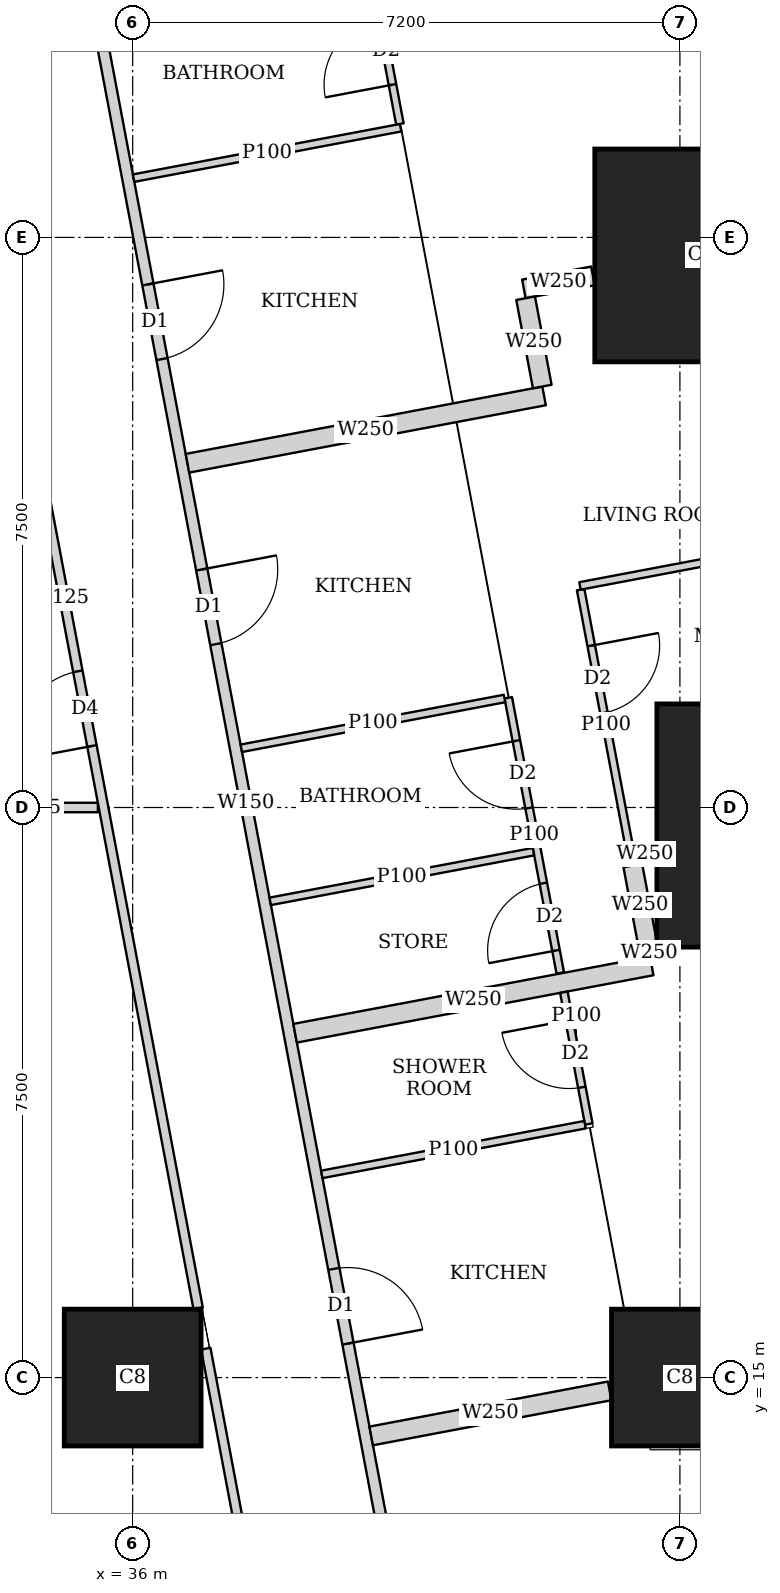
"""IFC4 building model, lengths in metres.
Left out: names, types, materials, properties, quantities, classifications, styles, units other than length and angle.
Written with IfcOpenShell. Run it as: python <this file> out.ifc"""

import sys

from ifc_helpers import new_model, si_unit, direction, frame, frame_2d, origin, origin_2d, place, context, subcontext, project, spatial, rectangle, extrude, element, fill, save


model = new_model("IFC4")
c1 = context("Model", 3, precision=1e-05, world=origin(), true_north=direction((0.0, 1.0)))
c2 = subcontext(c1, "Body", "Model", "MODEL_VIEW")
j1 = project(units=[si_unit("LENGTHUNIT", "METRE"), si_unit("PLANEANGLEUNIT", "RADIAN")], contexts=[c1])
p1 = place(None, origin())
s1 = spatial("IfcSite", under=j1, at=p1, CompositionType="ELEMENT")
p2 = place(p1, origin())
s2 = spatial("IfcBuilding", under=s1, at=p2, CompositionType="ELEMENT")
p3 = place(p2, frame((0.0, 0.0, 68.75)))
s3 = spatial("IfcBuildingStorey", under=s2, at=p3, CompositionType="ELEMENT", Elevation=68.75)
for number, where, z_axis, x_axis in (
    (1, (36.0, 15.0, 0.0), (0.0, 0.0, 1.0), (1.0, 0.0, 0.0)),
    (2, (43.2, 15.0, 0.0), (0.0, 0.0, 1.0), (1.0, 0.0, 0.0)),
):
    element("IfcColumn", number, at=place(p3, frame(where, z_axis=z_axis, x_axis=x_axis)), inside=s3, PredefinedType="COLUMN", context=c2, shape_type="SweptSolid", body=[
        extrude(rectangle(XDim=1.8, YDim=1.8, at=origin_2d()), origin(), (0.0, 0.0, 1.0), 3.75),
    ])
p4 = place(p3, frame((44.697, 22.263, 0.0), z_axis=(0.0, 0.0, 1.0), x_axis=(1.0, 0.0, 0.0)))
e3 = element("IfcColumn", 3, at=p4, inside=s3, PredefinedType="COLUMN", context=c2, shape_type="SweptSolid", body=[
    extrude(rectangle(XDim=3.6, YDim=3.2, at=origin_2d()), origin(), (0.0, 0.0, 1.0), 3.75),
])
p5 = place(p3, frame((43.48, 29.763, 0.0), z_axis=(0.0, 0.0, 1.0), x_axis=(1.0, 0.0, 0.0)))
e4 = element("IfcColumn", 4, at=p5, inside=s3, PredefinedType="COLUMN", context=c2, shape_type="SweptSolid", body=[
    extrude(rectangle(XDim=2.8, YDim=2.8, at=origin_2d()), origin(), (0.0, 0.0, 1.0), 3.75),
])
p6 = place(p3, frame((50.653, 2.703, 0.0), z_axis=(0.0, 0.0, 1.0), x_axis=(-0.185612026696, 0.982623109613, 0.0)))
e5 = element("IfcWall", 5, at=p6, inside=s3, PredefinedType="SOLIDWALL", context=c2, shape_type="SweptSolid", body=[
    extrude(rectangle(XDim=41.393, YDim=0.2, at=frame_2d((20.697, 0.0))), origin(), (0.0, 0.0, 1.0), 3.45),
])
p7 = place(p6, frame((1.633, 0.0, 0.9)))
e6 = element("IfcOpeningElement", 6, at=p7, cuts=e5, PredefinedType="OPENING", context=c2, shape_type="SweptSolid", body=[
    extrude(rectangle(XDim=1.8, YDim=1.5, at=frame_2d((0.9, 0.75))), frame((0.0, 0.11, 0.0), z_axis=(0.0, -1.0, 0.0), x_axis=(1.0, 0.0, 0.0)), (0.0, 0.0, 1.0), 0.22),
])
p8 = place(p6, frame((6.032, 0.0, 0.9)))
e7 = element("IfcOpeningElement", 7, at=p8, cuts=e5, PredefinedType="OPENING", context=c2, shape_type="SweptSolid", body=[
    extrude(rectangle(XDim=1.8, YDim=1.5, at=frame_2d((0.9, 0.75))), frame((0.0, 0.11, 0.0), z_axis=(0.0, -1.0, 0.0), x_axis=(1.0, 0.0, 0.0)), (0.0, 0.0, 1.0), 0.22),
])
p9 = place(p6, frame((9.848, 0.0, 0.9)))
e8 = element("IfcOpeningElement", 8, at=p9, cuts=e5, PredefinedType="OPENING", context=c2, shape_type="SweptSolid", body=[
    extrude(rectangle(XDim=1.8, YDim=1.5, at=frame_2d((0.9, 0.75))), frame((0.0, 0.11, 0.0), z_axis=(0.0, -1.0, 0.0), x_axis=(1.0, 0.0, 0.0)), (0.0, 0.0, 1.0), 0.22),
])
p10 = place(p6, frame((17.481, 0.0, 0.9)))
e9 = element("IfcOpeningElement", 9, at=p10, cuts=e5, PredefinedType="OPENING", context=c2, shape_type="SweptSolid", body=[
    extrude(rectangle(XDim=1.8, YDim=1.5, at=frame_2d((0.9, 0.75))), frame((0.0, 0.11, 0.0), z_axis=(0.0, -1.0, 0.0), x_axis=(1.0, 0.0, 0.0)), (0.0, 0.0, 1.0), 0.22),
])
p11 = place(p6, frame((21.297, 0.0, 0.9)))
e10 = element("IfcOpeningElement", 10, at=p11, cuts=e5, PredefinedType="OPENING", context=c2, shape_type="SweptSolid", body=[
    extrude(rectangle(XDim=1.8, YDim=1.5, at=frame_2d((0.9, 0.75))), frame((0.0, 0.11, 0.0), z_axis=(0.0, -1.0, 0.0), x_axis=(1.0, 0.0, 0.0)), (0.0, 0.0, 1.0), 0.22),
])
p12 = place(p6, frame((25.113, 0.0, 0.9)))
e11 = element("IfcOpeningElement", 11, at=p12, cuts=e5, PredefinedType="OPENING", context=c2, shape_type="SweptSolid", body=[
    extrude(rectangle(XDim=1.8, YDim=1.5, at=frame_2d((0.9, 0.75))), frame((0.0, 0.11, 0.0), z_axis=(0.0, -1.0, 0.0), x_axis=(1.0, 0.0, 0.0)), (0.0, 0.0, 1.0), 0.22),
])
p13 = place(p6, frame((28.93, 0.0, 0.9)))
e12 = element("IfcOpeningElement", 12, at=p13, cuts=e5, PredefinedType="OPENING", context=c2, shape_type="SweptSolid", body=[
    extrude(rectangle(XDim=1.8, YDim=1.5, at=frame_2d((0.9, 0.75))), frame((0.0, 0.11, 0.0), z_axis=(0.0, -1.0, 0.0), x_axis=(1.0, 0.0, 0.0)), (0.0, 0.0, 1.0), 0.22),
])
p14 = place(p6, frame((32.746, 0.0, 0.9)))
e13 = element("IfcOpeningElement", 13, at=p14, cuts=e5, PredefinedType="OPENING", context=c2, shape_type="SweptSolid", body=[
    extrude(rectangle(XDim=1.8, YDim=1.5, at=frame_2d((0.9, 0.75))), frame((0.0, 0.11, 0.0), z_axis=(0.0, -1.0, 0.0), x_axis=(1.0, 0.0, 0.0)), (0.0, 0.0, 1.0), 0.22),
])
p15 = place(p6, frame((36.481, 0.0, 0.9)))
e14 = element("IfcOpeningElement", 14, at=p15, cuts=e5, PredefinedType="OPENING", context=c2, shape_type="SweptSolid", body=[
    extrude(rectangle(XDim=1.8, YDim=1.5, at=frame_2d((0.9, 0.75))), frame((0.0, 0.11, 0.0), z_axis=(0.0, -1.0, 0.0), x_axis=(1.0, 0.0, 0.0)), (0.0, 0.0, 1.0), 0.22),
])
p16 = place(p3, frame((33.68, 42.723, 0.0), z_axis=(0.0, 0.0, 1.0), x_axis=(0.185624129307, -0.98262082342, 0.0)))
e15 = element("IfcWall", 15, at=p16, inside=s3, PredefinedType="SOLIDWALL", context=c2, shape_type="SweptSolid", body=[
    extrude(rectangle(XDim=41.051, YDim=0.15, at=frame_2d((20.526, 0.0))), origin(), (0.0, 0.0, 1.0), 2.45),
])
p17 = place(p16, frame((13.577, 0.0, 0.0)))
e16 = element("IfcOpeningElement", 16, at=p17, cuts=e15, PredefinedType="OPENING", context=c2, shape_type="SweptSolid", body=[
    extrude(rectangle(XDim=1.0, YDim=2.1, at=frame_2d((0.5, 1.05))), frame((0.0, 0.085, 0.0), z_axis=(0.0, -1.0, 0.0), x_axis=(1.0, 0.0, 0.0)), (0.0, 0.0, 1.0), 0.17),
])
p18 = place(p16, frame((17.394, 0.0, 0.0)))
e17 = element("IfcOpeningElement", 17, at=p18, cuts=e15, PredefinedType="OPENING", context=c2, shape_type="SweptSolid", body=[
    extrude(rectangle(XDim=1.0, YDim=2.1, at=frame_2d((0.5, 1.05))), frame((0.0, 0.085, 0.0), z_axis=(0.0, -1.0, 0.0), x_axis=(1.0, 0.0, 0.0)), (0.0, 0.0, 1.0), 0.17),
])
p19 = place(p16, frame((26.758, 0.0, 0.0)))
e18 = element("IfcOpeningElement", 18, at=p19, cuts=e15, PredefinedType="OPENING", context=c2, shape_type="SweptSolid", body=[
    extrude(rectangle(XDim=1.0, YDim=2.1, at=frame_2d((0.5, 1.05))), frame((0.0, 0.085, 0.0), z_axis=(0.0, -1.0, 0.0), x_axis=(1.0, 0.0, 0.0)), (0.0, 0.0, 1.0), 0.17),
])
p20 = place(p16, frame((32.193, 0.0, 0.0)))
e19 = element("IfcOpeningElement", 19, at=p20, cuts=e15, PredefinedType="OPENING", context=c2, shape_type="SweptSolid", body=[
    extrude(rectangle(XDim=1.0, YDim=2.1, at=frame_2d((0.5, 1.05))), frame((0.0, 0.085, 0.0), z_axis=(0.0, -1.0, 0.0), x_axis=(1.0, 0.0, 0.0)), (0.0, 0.0, 1.0), 0.17),
])
p21 = place(p3, frame((37.515, 42.089, 0.0), z_axis=(0.0, 0.0, 1.0), x_axis=(0.185565000991, -0.982631991341, 0.0)))
e20 = element("IfcWall", 20, at=p21, inside=s3, PredefinedType="PARTITIONING", context=c2, shape_type="SweptSolid", body=[
    extrude(rectangle(XDim=10.784, YDim=0.1, at=frame_2d((5.392, 0.0))), origin(), (0.0, 0.0, 1.0), 3.45),
])
p22 = place(p21, frame((9.358, 0.0, 0.0)))
e21 = element("IfcOpeningElement", 21, at=p22, cuts=e20, PredefinedType="OPENING", context=c2, shape_type="SweptSolid", body=[
    extrude(rectangle(XDim=0.9, YDim=2.1, at=frame_2d((0.45, 1.05))), frame((0.0, 0.06, 0.0), z_axis=(0.0, -1.0, 0.0), x_axis=(1.0, 0.0, 0.0)), (0.0, 0.0, 1.0), 0.12),
])
p23 = place(p21, frame((5.173, 0.0, 0.0)))
e22 = element("IfcOpeningElement", 22, at=p23, cuts=e20, PredefinedType="OPENING", context=c2, shape_type="SweptSolid", body=[
    extrude(rectangle(XDim=0.9, YDim=2.1, at=frame_2d((0.45, 1.05))), frame((0.0, 0.06, 0.0), z_axis=(0.0, -1.0, 0.0), x_axis=(1.0, 0.0, 0.0)), (0.0, 0.0, 1.0), 0.12),
])
p24 = place(p21, frame((2.629, 0.0, 0.0)))
e23 = element("IfcOpeningElement", 23, at=p24, cuts=e20, PredefinedType="OPENING", context=c2, shape_type="SweptSolid", body=[
    extrude(rectangle(XDim=0.9, YDim=2.1, at=frame_2d((0.45, 1.05))), frame((0.0, 0.06, 0.0), z_axis=(0.0, -1.0, 0.0), x_axis=(1.0, 0.0, 0.0)), (0.0, 0.0, 1.0), 0.12),
])
p25 = place(p21, frame((7.451, 0.0, 0.0)))
e24 = element("IfcOpeningElement", 24, at=p25, cuts=e20, PredefinedType="OPENING", context=c2, shape_type="SweptSolid", body=[
    extrude(rectangle(XDim=0.9, YDim=2.1, at=frame_2d((0.45, 1.05))), frame((0.0, 0.06, 0.0), z_axis=(0.0, -1.0, 0.0), x_axis=(1.0, 0.0, 0.0)), (0.0, 0.0, 1.0), 0.12),
])
p26 = place(p3, frame((39.525, 31.443, 0.0), z_axis=(0.0, 0.0, 1.0), x_axis=(-0.982648035033, -0.185480023848, 0.0)))
e25 = element("IfcWall", 25, at=p26, inside=s3, PredefinedType="PARTITIONING", context=c2, shape_type="SweptSolid", body=[
    extrude(rectangle(XDim=3.575, YDim=0.1, at=frame_2d((1.788, 0.0))), origin(), (0.0, 0.0, 1.0), 3.45),
])
p27 = place(p3, frame((41.894, 25.366, 0.0), z_axis=(0.0, 0.0, 1.0), x_axis=(0.185611839851, -0.982623144907, 0.0)))
e26 = element("IfcWall", 26, at=p27, inside=s3, PredefinedType="PARTITIONING", context=c2, shape_type="SweptSolid", body=[
    extrude(rectangle(XDim=3.62, YDim=0.1, at=frame_2d((1.81, 0.0))), origin(), (0.0, 0.0, 1.0), 2.45),
])
p28 = place(p27, frame((0.75, 0.0, 0.0)))
e27 = element("IfcOpeningElement", 27, at=p28, cuts=e26, PredefinedType="OPENING", context=c2, shape_type="SweptSolid", body=[
    extrude(rectangle(XDim=0.9, YDim=2.1, at=frame_2d((0.45, 1.05))), frame((0.0, 0.06, 0.0), z_axis=(0.0, -1.0, 0.0), x_axis=(1.0, 0.0, 0.0)), (0.0, 0.0, 1.0), 0.12),
])
p29 = place(p3, frame((40.942, 23.943, 0.0), z_axis=(0.0, 0.0, 1.0), x_axis=(0.185632361754, -0.982619268216, 0.0)))
e28 = element("IfcWall", 28, at=p29, inside=s3, PredefinedType="PARTITIONING", context=c2, shape_type="SweptSolid", body=[
    extrude(rectangle(XDim=3.685, YDim=0.1, at=frame_2d((1.843, 0.0))), origin(), (0.0, 0.0, 1.0), 2.45),
])
p30 = place(p29, frame((0.575, 0.0, 0.0)))
e29 = element("IfcOpeningElement", 29, at=p30, cuts=e28, PredefinedType="OPENING", context=c2, shape_type="SweptSolid", body=[
    extrude(rectangle(XDim=0.9, YDim=2.1, at=frame_2d((0.45, 1.05))), frame((0.0, 0.06, 0.0), z_axis=(0.0, -1.0, 0.0), x_axis=(1.0, 0.0, 0.0)), (0.0, 0.0, 1.0), 0.12),
])
p31 = place(p29, frame((2.483, 0.0, 0.0)))
e30 = element("IfcOpeningElement", 30, at=p31, cuts=e28, PredefinedType="OPENING", context=c2, shape_type="SweptSolid", body=[
    extrude(rectangle(XDim=0.9, YDim=2.1, at=frame_2d((0.45, 1.05))), frame((0.0, 0.06, 0.0), z_axis=(0.0, -1.0, 0.0), x_axis=(1.0, 0.0, 0.0)), (0.0, 0.0, 1.0), 0.12),
])
p32 = place(p3, frame((46.11, 26.213, 0.0), z_axis=(0.0, 0.0, 1.0), x_axis=(-0.982633535512, -0.185556823879, 0.0)))
e31 = element("IfcWall", 31, at=p32, inside=s3, PredefinedType="PARTITIONING", context=c2, shape_type="SweptSolid", body=[
    extrude(rectangle(XDim=4.3, YDim=0.1, at=frame_2d((2.15, 0.0))), origin(), (0.0, 0.0, 1.0), 2.0),
])
p33 = place(p3, frame((40.893, 23.934, 0.0), z_axis=(0.0, 0.0, 1.0), x_axis=(-0.982588017646, -0.185797706064, 0.0)))
e32 = element("IfcWall", 32, at=p33, inside=s3, PredefinedType="PARTITIONING", context=c2, shape_type="SweptSolid", body=[
    extrude(rectangle(XDim=3.525, YDim=0.1, at=frame_2d((1.763, 0.0))), origin(), (0.0, 0.0, 1.0), 3.45),
])
p34 = place(p3, frame((41.273, 21.919, 0.0), z_axis=(0.0, 0.0, 1.0), x_axis=(-0.982636169624, -0.185542874149, 0.0)))
e33 = element("IfcWall", 33, at=p34, inside=s3, PredefinedType="PARTITIONING", context=c2, shape_type="SweptSolid", body=[
    extrude(rectangle(XDim=3.525, YDim=0.1, at=frame_2d((1.763, 0.0))), origin(), (0.0, 0.0, 1.0), 2.45),
])
p35 = place(p3, frame((42.056, 29.494, 0.0), z_axis=(0.0, 0.0, 1.0), x_axis=(-0.982587178881, -0.185802141803, 0.0)))
e34 = element("IfcWall", 34, at=p35, inside=s3, PredefinedType="SOLIDWALL", context=c2, shape_type="SweptSolid", body=[
    extrude(rectangle(XDim=0.925, YDim=0.25, at=frame_2d((0.462, 0.0))), origin(), (0.0, 0.0, 1.0), 2.45),
])
p36 = place(p3, frame((41.413, 27.915, 0.0), z_axis=(0.0, 0.0, 1.0), x_axis=(-0.982635807605, -0.185544791394, 0.0)))
e35 = element("IfcWall", 35, at=p36, inside=s3, PredefinedType="SOLIDWALL", context=c2, shape_type="SweptSolid", body=[
    extrude(rectangle(XDim=4.775, YDim=0.25, at=frame_2d((2.388, 0.0))), origin(), (0.0, 0.0, 1.0), 3.45),
])
p37 = place(p3, frame((41.17, 29.2, 0.0), z_axis=(0.0, 0.0, 1.0), x_axis=(0.185223510709, -0.982696418575, 0.0)))
e36 = element("IfcWall", 36, at=p37, inside=s3, PredefinedType="SOLIDWALL", context=c2, shape_type="SweptSolid", body=[
    extrude(rectangle(XDim=1.182, YDim=0.25, at=frame_2d((0.591, 0.0))), origin(), (0.0, 0.0, 1.0), 2.45),
])
p38 = place(p3, frame((41.673, 20.07, 0.0), z_axis=(0.0, 0.0, 1.0), x_axis=(0.185783379659, -0.98259072652, 0.0)))
e37 = element("IfcWall", 37, at=p38, inside=s3, PredefinedType="PARTITIONING", context=c2, shape_type="SweptSolid", body=[
    extrude(rectangle(XDim=1.765, YDim=0.1, at=frame_2d((0.882, 0.0))), origin(), (0.0, 0.0, 1.0), 3.45),
])
p39 = place(p38, frame((0.374, 0.0, 0.0)))
e38 = element("IfcOpeningElement", 38, at=p39, cuts=e37, PredefinedType="OPENING", context=c2, shape_type="SweptSolid", body=[
    extrude(rectangle(XDim=0.9, YDim=2.1, at=frame_2d((0.45, 1.05))), frame((0.0, 0.06, 0.0), z_axis=(0.0, -1.0, 0.0), x_axis=(1.0, 0.0, 0.0)), (0.0, 0.0, 1.0), 0.12),
])
p40 = place(p3, frame((41.952, 18.327, 0.0), z_axis=(0.0, 0.0, 1.0), x_axis=(-0.982648794755, -0.185475998897, 0.0)))
e39 = element("IfcWall", 39, at=p40, inside=s3, PredefinedType="PARTITIONING", context=c2, shape_type="SweptSolid", body=[
    extrude(rectangle(XDim=3.525, YDim=0.1, at=frame_2d((1.763, 0.0))), origin(), (0.0, 0.0, 1.0), 3.45),
])
p41 = place(p3, frame((42.873, 21.918, 0.0), z_axis=(0.0, 0.0, 1.0), x_axis=(-0.982892522967, -0.184180043152, 0.0)))
e40 = element("IfcWall", 40, at=p41, inside=s3, PredefinedType="SOLIDWALL", context=c2, shape_type="SweptSolid", body=[
    extrude(rectangle(XDim=0.272, YDim=0.25, at=frame_2d((0.136, 0.0))), origin(), (0.0, 0.0, 1.0), 2.45),
])
p42 = place(p3, frame((42.829, 20.416, 0.0), z_axis=(0.0, 0.0, 1.0), x_axis=(-0.982635807605, -0.185544791394, 0.0)))
e41 = element("IfcWall", 41, at=p42, inside=s3, PredefinedType="SOLIDWALL", context=c2, shape_type="SweptSolid", body=[
    extrude(rectangle(XDim=4.775, YDim=0.25, at=frame_2d((2.388, 0.0))), origin(), (0.0, 0.0, 1.0), 3.45),
])
p43 = place(p3, frame((42.58, 21.736, 0.0), z_axis=(0.0, 0.0, 1.0), x_axis=(0.185458925981, -0.982652017132, 0.0)))
e42 = element("IfcWall", 42, at=p43, inside=s3, PredefinedType="SOLIDWALL", context=c2, shape_type="SweptSolid", body=[
    extrude(rectangle(XDim=1.045, YDim=0.25, at=frame_2d((0.522, 0.0))), origin(), (0.0, 0.0, 1.0), 2.45),
])
p44 = place(p3, frame((42.787, 20.639, 0.0), z_axis=(0.0, 0.0, 1.0), x_axis=(0.185013851593, -0.982735913009, 0.0)))
e43 = element("IfcWall", 43, at=p44, inside=s3, PredefinedType="SOLIDWALL", context=c2, shape_type="SweptSolid", body=[
    extrude(rectangle(XDim=0.102, YDim=0.25, at=frame_2d((0.051, 0.0))), origin(), (0.0, 0.0, 1.0), 3.45),
])
p45 = place(p3, frame((42.276, 14.825, 0.0), z_axis=(0.0, 0.0, 1.0), x_axis=(-0.982607211054, -0.185696173318, 0.0)))
e44 = element("IfcWall", 44, at=p45, inside=s3, PredefinedType="SOLIDWALL", context=c2, shape_type="SweptSolid", body=[
    extrude(rectangle(XDim=3.194, YDim=0.25, at=frame_2d((1.597, 0.0))), origin(), (0.0, 0.0, 1.0), 3.45),
])
p46 = place(p3, frame((37.9, 10.413, 0.0), z_axis=(0.0, 0.0, 1.0), x_axis=(-0.185527510388, 0.982639070508, 0.0)))
e45 = element("IfcWall", 45, at=p46, inside=s3, PredefinedType="PARTITIONING", context=c2, shape_type="SweptSolid", body=[
    extrude(rectangle(XDim=5.056, YDim=0.125, at=frame_2d((2.528, 0.0))), origin(), (0.0, 0.0, 1.0), 3.45),
])
p47 = place(p46, frame((0.708, 0.0, 0.0)))
e46 = element("IfcOpeningElement", 46, at=p47, cuts=e45, PredefinedType="OPENING", context=c2, shape_type="SweptSolid", body=[
    extrude(rectangle(XDim=1.0, YDim=2.1, at=frame_2d((0.5, 1.05))), frame((0.0, 0.073, 0.0), z_axis=(0.0, -1.0, 0.0), x_axis=(1.0, 0.0, 0.0)), (0.0, 0.0, 1.0), 0.145),
])
p48 = place(p3, frame((36.861, 15.913, 0.0), z_axis=(0.0, 0.0, 1.0), x_axis=(-0.185588307143, 0.982627589808, 0.0)))
e47 = element("IfcWall", 47, at=p48, inside=s3, PredefinedType="PARTITIONING", context=c2, shape_type="SweptSolid", body=[
    extrude(rectangle(XDim=19.005, YDim=0.125, at=frame_2d((9.502, 0.0))), origin(), (0.0, 0.0, 1.0), 2.45),
])
p49 = place(p48, frame((7.527, 0.0, 0.0)))
e48 = element("IfcOpeningElement", 48, at=p49, cuts=e47, PredefinedType="OPENING", context=c2, shape_type="SweptSolid", body=[
    extrude(rectangle(XDim=1.0, YDim=2.1, at=frame_2d((0.5, 1.05))), frame((0.0, 0.073, 0.0), z_axis=(0.0, -1.0, 0.0), x_axis=(1.0, 0.0, 0.0)), (0.0, 0.0, 1.0), 0.145),
])
p50 = place(p48, frame((15.5, 0.0, 0.0)))
e49 = element("IfcOpeningElement", 49, at=p50, cuts=e47, PredefinedType="OPENING", context=c2, shape_type="SweptSolid", body=[
    extrude(rectangle(XDim=1.0, YDim=2.1, at=frame_2d((0.5, 1.05))), frame((0.0, 0.073, 0.0), z_axis=(0.0, -1.0, 0.0), x_axis=(1.0, 0.0, 0.0)), (0.0, 0.0, 1.0), 0.145),
])
p51 = place(p48, frame((17.602, 0.0, 0.0)))
e50 = element("IfcOpeningElement", 50, at=p51, cuts=e47, PredefinedType="OPENING", context=c2, shape_type="SweptSolid", body=[
    extrude(rectangle(XDim=1.0, YDim=2.1, at=frame_2d((0.5, 1.05))), frame((0.0, 0.073, 0.0), z_axis=(0.0, -1.0, 0.0), x_axis=(1.0, 0.0, 0.0)), (0.0, 0.0, 1.0), 0.145),
])
p52 = place(p3, frame((33.901, 22.5, 0.0), z_axis=(0.0, 0.0, 1.0), x_axis=(1.0, 0.0, 0.0)))
e51 = element("IfcWall", 51, at=p52, inside=s3, PredefinedType="PARTITIONING", context=c2, shape_type="SweptSolid", body=[
    extrude(rectangle(XDim=1.641, YDim=0.125, at=frame_2d((0.821, 0.0))), origin(), (0.0, 0.0, 1.0), 2.45),
])
p53 = place(p22, origin())
e52 = element("IfcDoor", 52, at=p53, inside=s3, OperationType="SINGLE_SWING_LEFT", PredefinedType="DOOR", context=c2, shape_type="SweptSolid", body=[
    extrude(rectangle(XDim=0.9, YDim=2.1, at=frame_2d((0.45, 1.05))), frame((0.0, 0.025, 0.0), z_axis=(0.0, -1.0, 0.0), x_axis=(1.0, 0.0, 0.0)), (0.0, 0.0, 1.0), 0.05),
])
fill(e21, e52)
p54 = place(p17, origin())
e53 = element("IfcDoor", 53, at=p54, inside=s3, OperationType="SINGLE_SWING_LEFT", PredefinedType="DOOR", context=c2, shape_type="SweptSolid", body=[
    extrude(rectangle(XDim=1.0, YDim=2.1, at=frame_2d((0.5, 1.05))), frame((0.0, 0.025, 0.0), z_axis=(0.0, -1.0, 0.0), x_axis=(1.0, 0.0, 0.0)), (0.0, 0.0, 1.0), 0.05),
])
fill(e16, e53)
p55 = place(p28, origin())
e54 = element("IfcDoor", 54, at=p55, inside=s3, OperationType="SINGLE_SWING_LEFT", PredefinedType="DOOR", context=c2, shape_type="SweptSolid", body=[
    extrude(rectangle(XDim=0.9, YDim=2.1, at=frame_2d((0.45, 1.05))), frame((0.0, 0.025, 0.0), z_axis=(0.0, -1.0, 0.0), x_axis=(1.0, 0.0, 0.0)), (0.0, 0.0, 1.0), 0.05),
])
fill(e27, e54)
p56 = place(p30, origin())
e55 = element("IfcDoor", 55, at=p56, inside=s3, OperationType="SINGLE_SWING_RIGHT", PredefinedType="DOOR", context=c2, shape_type="SweptSolid", body=[
    extrude(rectangle(XDim=0.9, YDim=2.1, at=frame_2d((0.45, 1.05))), frame((0.0, 0.025, 0.0), z_axis=(0.0, -1.0, 0.0), x_axis=(1.0, 0.0, 0.0)), (0.0, 0.0, 1.0), 0.05),
])
fill(e29, e55)
p57 = place(p31, origin())
e56 = element("IfcDoor", 56, at=p57, inside=s3, OperationType="SINGLE_SWING_LEFT", PredefinedType="DOOR", context=c2, shape_type="SweptSolid", body=[
    extrude(rectangle(XDim=0.9, YDim=2.1, at=frame_2d((0.45, 1.05))), frame((0.0, 0.025, 0.0), z_axis=(0.0, -1.0, 0.0), x_axis=(1.0, 0.0, 0.0)), (0.0, 0.0, 1.0), 0.05),
])
fill(e30, e56)
p58 = place(p18, origin())
e57 = element("IfcDoor", 57, at=p58, inside=s3, OperationType="SINGLE_SWING_LEFT", PredefinedType="DOOR", context=c2, shape_type="SweptSolid", body=[
    extrude(rectangle(XDim=1.0, YDim=2.1, at=frame_2d((0.5, 1.05))), frame((0.0, 0.025, 0.0), z_axis=(0.0, -1.0, 0.0), x_axis=(1.0, 0.0, 0.0)), (0.0, 0.0, 1.0), 0.05),
])
fill(e17, e57)
p59 = place(p39, origin())
e58 = element("IfcDoor", 58, at=p59, inside=s3, OperationType="SINGLE_SWING_RIGHT", PredefinedType="DOOR", context=c2, shape_type="SweptSolid", body=[
    extrude(rectangle(XDim=0.9, YDim=2.1, at=frame_2d((0.45, 1.05))), frame((0.0, 0.025, 0.0), z_axis=(0.0, -1.0, 0.0), x_axis=(1.0, 0.0, 0.0)), (0.0, 0.0, 1.0), 0.05),
])
fill(e38, e58)
p60 = place(p19, origin())
e59 = element("IfcDoor", 59, at=p60, inside=s3, OperationType="SINGLE_SWING_RIGHT", PredefinedType="DOOR", context=c2, shape_type="SweptSolid", body=[
    extrude(rectangle(XDim=1.0, YDim=2.1, at=frame_2d((0.5, 1.05))), frame((0.0, 0.025, 0.0), z_axis=(0.0, -1.0, 0.0), x_axis=(1.0, 0.0, 0.0)), (0.0, 0.0, 1.0), 0.05),
])
fill(e18, e59)
p61 = place(p49, origin())
e60 = element("IfcDoor", 60, at=p61, inside=s3, OperationType="SINGLE_SWING_LEFT", PredefinedType="DOOR", context=c2, shape_type="SweptSolid", body=[
    extrude(rectangle(XDim=1.0, YDim=2.1, at=frame_2d((0.5, 1.05))), frame((0.0, 0.025, 0.0), z_axis=(0.0, -1.0, 0.0), x_axis=(1.0, 0.0, 0.0)), (0.0, 0.0, 1.0), 0.05),
])
fill(e48, e60)
save(model, sys.argv[1])
